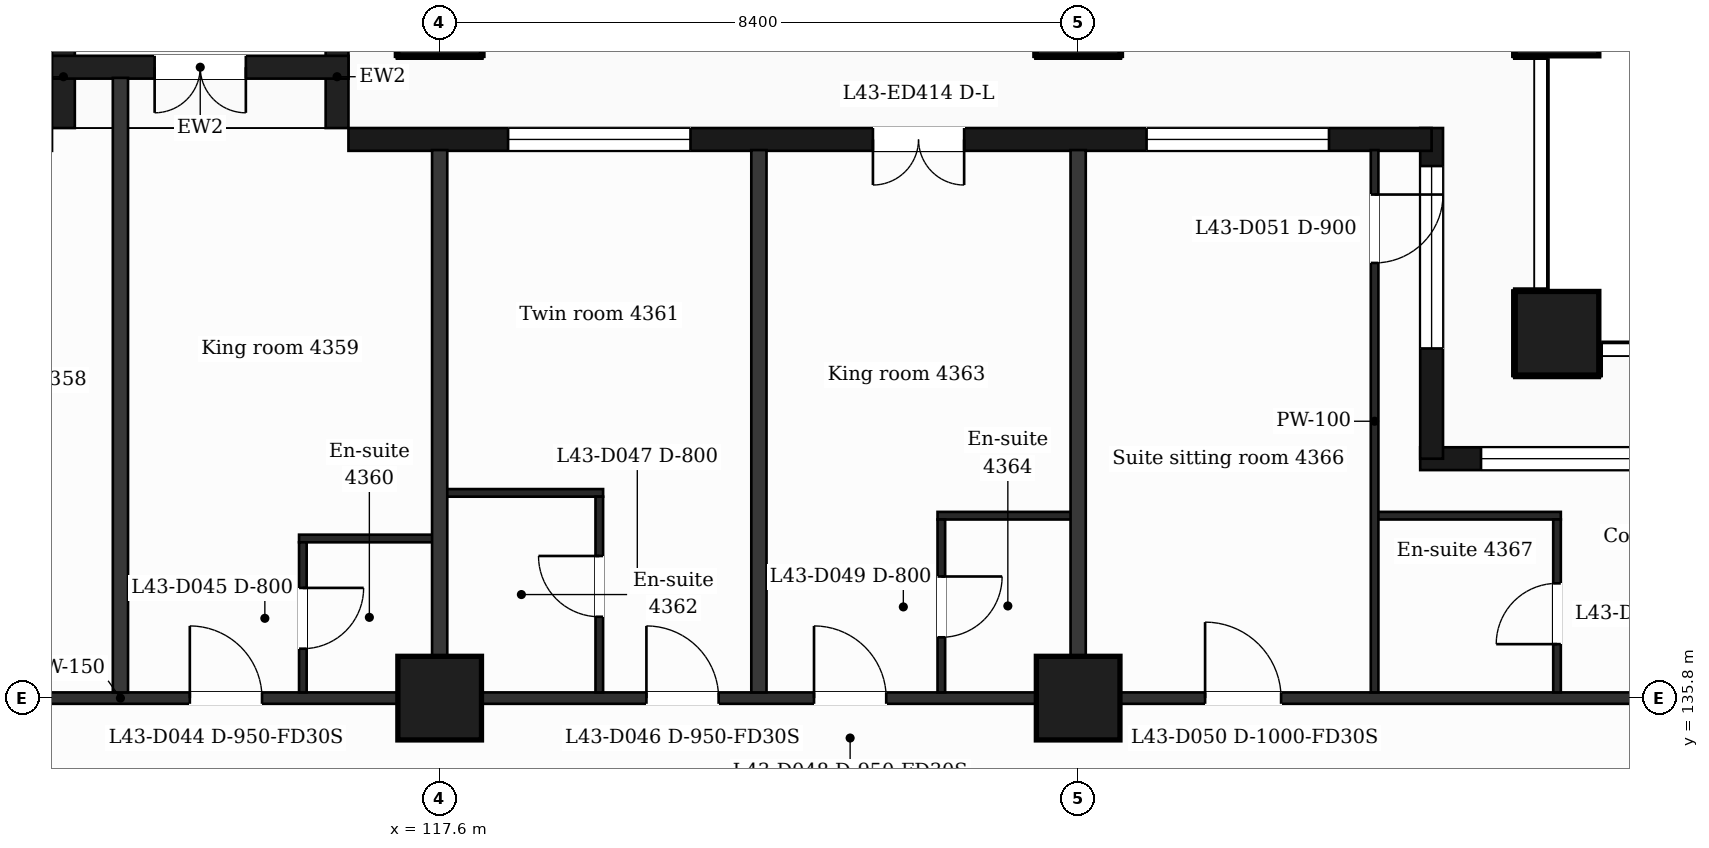
"""IFC4 building model, lengths in metres.
Left out: names, types, materials, properties, quantities, classifications, styles, units other than length and angle.
Written with IfcOpenShell. Run it as: python <this file> out.ifc"""

import sys

from ifc_helpers import new_model, si_unit, direction, frame, frame_2d, origin, origin_2d, place, context, subcontext, project, spatial, rectangle, extrude, element, fill, save


model = new_model("IFC4")
c1 = context("Model", 3, precision=1e-05, world=origin(), true_north=direction((0.0, 1.0)))
c2 = subcontext(c1, "Body", "Model", "MODEL_VIEW")
j1 = project(units=[si_unit("LENGTHUNIT", "METRE"), si_unit("PLANEANGLEUNIT", "RADIAN")], contexts=[c1])
p1 = place(None, origin())
s1 = spatial("IfcSite", under=j1, at=p1, CompositionType="ELEMENT")
p2 = place(p1, origin())
s2 = spatial("IfcBuilding", under=s1, at=p2, CompositionType="ELEMENT")
p3 = place(p2, frame((0.0, 0.0, 181.1)))
s3 = spatial("IfcBuildingStorey", under=s2, at=p3, CompositionType="ELEMENT", Elevation=181.1)
for number, where, z_axis, x_axis in (
    (1, (132.3, 140.6, 0.0), (0.0, 0.0, 1.0), (1.0, 0.0, 0.0)),
    (2, (117.6, 135.8, 0.0), (0.0, 0.0, 1.0), (1.0, 0.0, 0.0)),
    (3, (126.0, 135.8, 0.0), (0.0, 0.0, 1.0), (1.0, 0.0, 0.0)),
    (4, (117.6, 144.8, 0.0), (0.0, 0.0, 1.0), (1.0, 0.0, 0.0)),
    (5, (126.0, 144.8, 0.0), (0.0, 0.0, 1.0), (1.0, 0.0, 0.0)),
    (6, (132.3, 144.8, 0.0), (0.0, 0.0, 1.0), (1.0, 0.0, 0.0)),
):
    element("IfcColumn", number, at=place(p3, frame(where, z_axis=z_axis, x_axis=x_axis)), inside=s3, PredefinedType="COLUMN", context=c2, shape_type="SweptSolid", body=[
        extrude(rectangle(XDim=1.1, YDim=1.1, at=origin_2d()), origin(), (0.0, 0.0, 1.0), 3.7),
    ])
p4 = place(p3, frame((135.623, 138.95, 0.0), z_axis=(0.0, 0.0, 1.0), x_axis=(-1.0, 0.0, 0.0)))
e7 = element("IfcWall", 7, at=p4, inside=s3, PredefinedType="SOLIDWALL", context=c2, shape_type="SweptSolid", body=[
    extrude(rectangle(XDim=5.123, YDim=0.3, at=frame_2d((2.561, 0.0))), origin(), (0.0, 0.0, 1.0), 3.38),
])
p5 = place(p4, frame((1.923, 0.0, 0.9)))
e8 = element("IfcOpeningElement", 8, at=p5, cuts=e7, PredefinedType="OPENING", context=c2, shape_type="SweptSolid", body=[
    extrude(rectangle(XDim=2.4, YDim=2.1, at=frame_2d((1.2, 1.05))), frame((0.0, 0.16, 0.0), z_axis=(0.0, -1.0, 0.0), x_axis=(1.0, 0.0, 0.0)), (0.0, 0.0, 1.0), 0.32),
])
p6 = place(p3, frame((130.65, 138.95, 0.0), z_axis=(0.0, 0.0, 1.0), x_axis=(0.0, 1.0, 0.0)))
e9 = element("IfcWall", 9, at=p6, inside=s3, PredefinedType="SOLIDWALL", context=c2, shape_type="SweptSolid", body=[
    extrude(rectangle(XDim=4.35, YDim=0.3, at=frame_2d((2.175, 0.0))), origin(), (0.0, 0.0, 1.0), 3.38),
])
p7 = place(p6, frame((1.45, 0.0, 0.9)))
e10 = element("IfcOpeningElement", 10, at=p7, cuts=e9, PredefinedType="OPENING", context=c2, shape_type="SweptSolid", body=[
    extrude(rectangle(XDim=2.4, YDim=2.1, at=frame_2d((1.2, 1.05))), frame((0.0, 0.16, 0.0), z_axis=(0.0, -1.0, 0.0), x_axis=(1.0, 0.0, 0.0)), (0.0, 0.0, 1.0), 0.32),
])
p8 = place(p3, frame((130.65, 143.15, 0.0), z_axis=(0.0, 0.0, 1.0), x_axis=(-1.0, 0.0, 0.0)))
e11 = element("IfcWall", 11, at=p8, inside=s3, PredefinedType="SOLIDWALL", context=c2, shape_type="SweptSolid", body=[
    extrude(rectangle(XDim=14.25, YDim=0.3, at=frame_2d((7.125, 0.0))), origin(), (0.0, 0.0, 1.0), 3.38),
])
p9 = place(p8, frame((1.35, 0.0, 0.9)))
e12 = element("IfcOpeningElement", 12, at=p9, cuts=e11, PredefinedType="OPENING", context=c2, shape_type="SweptSolid", body=[
    extrude(rectangle(XDim=2.4, YDim=2.1, at=frame_2d((1.2, 1.05))), frame((0.0, 0.16, 0.0), z_axis=(0.0, -1.0, 0.0), x_axis=(1.0, 0.0, 0.0)), (0.0, 0.0, 1.0), 0.32),
])
p10 = place(p8, frame((6.15, 0.0, 0.0)))
e13 = element("IfcOpeningElement", 13, at=p10, cuts=e11, PredefinedType="OPENING", context=c2, shape_type="SweptSolid", body=[
    extrude(rectangle(XDim=1.2, YDim=2.4, at=frame_2d((0.6, 1.2))), frame((0.0, 0.16, 0.0), z_axis=(0.0, -1.0, 0.0), x_axis=(1.0, 0.0, 0.0)), (0.0, 0.0, 1.0), 0.32),
])
p11 = place(p8, frame((9.75, 0.0, 0.9)))
e14 = element("IfcOpeningElement", 14, at=p11, cuts=e11, PredefinedType="OPENING", context=c2, shape_type="SweptSolid", body=[
    extrude(rectangle(XDim=2.4, YDim=2.1, at=frame_2d((1.2, 1.05))), frame((0.0, 0.16, 0.0), z_axis=(0.0, -1.0, 0.0), x_axis=(1.0, 0.0, 0.0)), (0.0, 0.0, 1.0), 0.32),
])
for number, where, z_axis, x_axis in (
    (15, (116.25, 143.3, 0.0), (0.0, 0.0, 1.0), (0.0, 1.0, 0.0)),
    (16, (112.65, 143.3, 0.0), (0.0, 0.0, 1.0), (0.0, 1.0, 0.0)),
):
    element("IfcWall", number, at=place(p3, frame(where, z_axis=z_axis, x_axis=x_axis)), inside=s3, PredefinedType="SOLIDWALL", context=c2, shape_type="SweptSolid", body=[
        extrude(rectangle(XDim=1.35, YDim=0.3, at=frame_2d((0.675, 0.0))), origin(), (0.0, 0.0, 1.0), 3.38),
    ])
p12 = place(p3, frame((116.4, 144.1, 0.0), z_axis=(0.0, 0.0, 1.0), x_axis=(-1.0, 0.0, 0.0)))
e17 = element("IfcWall", 17, at=p12, inside=s3, PredefinedType="SOLIDWALL", context=c2, shape_type="SweptSolid", body=[
    extrude(rectangle(XDim=3.9, YDim=0.3, at=frame_2d((1.95, 0.0))), origin(), (0.0, 0.0, 1.0), 3.38),
])
p13 = place(p12, frame((1.35, 0.0, 0.0)))
e18 = element("IfcOpeningElement", 18, at=p13, cuts=e17, PredefinedType="OPENING", context=c2, shape_type="SweptSolid", body=[
    extrude(rectangle(XDim=1.2, YDim=2.4, at=frame_2d((0.6, 1.2))), frame((0.0, 0.16, 0.0), z_axis=(0.0, -1.0, 0.0), x_axis=(1.0, 0.0, 0.0)), (0.0, 0.0, 1.0), 0.32),
])
p14 = place(p3, frame((90.895, 135.8, 0.0), z_axis=(0.0, 0.0, 1.0), x_axis=(1.0, 0.0, 0.0)))
e19 = element("IfcWall", 19, at=p14, inside=s3, PredefinedType="PARTITIONING", context=c2, shape_type="SweptSolid", body=[
    extrude(rectangle(XDim=45.011, YDim=0.15, at=frame_2d((22.505, 0.0))), origin(), (0.0, 0.0, 1.0), 3.38),
])
p15 = place(p14, frame((6.906, 0.0, 0.0)))
e20 = element("IfcOpeningElement", 20, at=p15, cuts=e19, PredefinedType="OPENING", context=c2, shape_type="SweptSolid", body=[
    extrude(rectangle(XDim=1.0, YDim=2.1, at=frame_2d((0.5, 1.05))), frame((0.0, 0.085, 0.0), z_axis=(0.0, -1.0, 0.0), x_axis=(1.0, 0.0, 0.0)), (0.0, 0.0, 1.0), 0.17),
])
p16 = place(p14, frame((11.875, 0.0, 0.0)))
e21 = element("IfcOpeningElement", 21, at=p16, cuts=e19, PredefinedType="OPENING", context=c2, shape_type="SweptSolid", body=[
    extrude(rectangle(XDim=0.95, YDim=2.1, at=frame_2d((0.475, 1.05))), frame((0.0, 0.085, 0.0), z_axis=(0.0, -1.0, 0.0), x_axis=(1.0, 0.0, 0.0)), (0.0, 0.0, 1.0), 0.17),
])
p17 = place(p14, frame((19.292, 0.0, 0.0)))
e22 = element("IfcOpeningElement", 22, at=p17, cuts=e19, PredefinedType="OPENING", context=c2, shape_type="SweptSolid", body=[
    extrude(rectangle(XDim=0.95, YDim=2.1, at=frame_2d((0.475, 1.05))), frame((0.0, 0.085, 0.0), z_axis=(0.0, -1.0, 0.0), x_axis=(1.0, 0.0, 0.0)), (0.0, 0.0, 1.0), 0.17),
])
p18 = place(p14, frame((23.418, 0.0, 0.0)))
e23 = element("IfcOpeningElement", 23, at=p18, cuts=e19, PredefinedType="OPENING", context=c2, shape_type="SweptSolid", body=[
    extrude(rectangle(XDim=0.95, YDim=2.1, at=frame_2d((0.475, 1.05))), frame((0.0, 0.085, 0.0), z_axis=(0.0, -1.0, 0.0), x_axis=(1.0, 0.0, 0.0)), (0.0, 0.0, 1.0), 0.17),
])
p19 = place(p14, frame((29.425, 0.0, 0.0)))
e24 = element("IfcOpeningElement", 24, at=p19, cuts=e19, PredefinedType="OPENING", context=c2, shape_type="SweptSolid", body=[
    extrude(rectangle(XDim=0.95, YDim=2.1, at=frame_2d((0.475, 1.05))), frame((0.0, 0.085, 0.0), z_axis=(0.0, -1.0, 0.0), x_axis=(1.0, 0.0, 0.0)), (0.0, 0.0, 1.0), 0.17),
])
p20 = place(p14, frame((31.63, 0.0, 0.0)))
e25 = element("IfcOpeningElement", 25, at=p20, cuts=e19, PredefinedType="OPENING", context=c2, shape_type="SweptSolid", body=[
    extrude(rectangle(XDim=0.95, YDim=2.1, at=frame_2d((0.475, 1.05))), frame((0.0, 0.085, 0.0), z_axis=(0.0, -1.0, 0.0), x_axis=(1.0, 0.0, 0.0)), (0.0, 0.0, 1.0), 0.17),
])
p21 = place(p14, frame((36.775, 0.0, 0.0)))
e26 = element("IfcOpeningElement", 26, at=p21, cuts=e19, PredefinedType="OPENING", context=c2, shape_type="SweptSolid", body=[
    extrude(rectangle(XDim=1.0, YDim=2.1, at=frame_2d((0.5, 1.05))), frame((0.0, 0.085, 0.0), z_axis=(0.0, -1.0, 0.0), x_axis=(1.0, 0.0, 0.0)), (0.0, 0.0, 1.0), 0.17),
])
for number, where, z_axis, x_axis in (
    (27, (115.75, 137.9, 0.0), (0.0, 0.0, 1.0), (1.0, 0.0, 0.0)),
    (28, (124.15, 138.2, 0.0), (0.0, 0.0, 1.0), (1.0, 0.0, 0.0)),
):
    element("IfcWall", number, at=place(p3, frame(where, z_axis=z_axis, x_axis=x_axis)), inside=s3, PredefinedType="PARTITIONING", context=c2, shape_type="SweptSolid", body=[
        extrude(rectangle(XDim=1.85, YDim=0.1, at=frame_2d((0.925, 0.0))), origin(), (0.0, 0.0, 1.0), 3.38),
    ])
p22 = place(p3, frame((129.9, 138.2, 0.0), z_axis=(0.0, 0.0, 1.0), x_axis=(1.0, 0.0, 0.0)))
e29 = element("IfcWall", 29, at=p22, inside=s3, PredefinedType="PARTITIONING", context=c2, shape_type="SweptSolid", body=[
    extrude(rectangle(XDim=2.45, YDim=0.1, at=frame_2d((1.225, 0.0))), origin(), (0.0, 0.0, 1.0), 3.38),
])
p23 = place(p3, frame((117.6, 138.5, 0.0), z_axis=(0.0, 0.0, 1.0), x_axis=(1.0, 0.0, 0.0)))
e30 = element("IfcWall", 30, at=p23, inside=s3, PredefinedType="PARTITIONING", context=c2, shape_type="SweptSolid", body=[
    extrude(rectangle(XDim=2.15, YDim=0.1, at=frame_2d((1.075, 0.0))), origin(), (0.0, 0.0, 1.0), 3.38),
])
p24 = place(p3, frame((113.4, 135.875, 0.0), z_axis=(0.0, 0.0, 1.0), x_axis=(0.0, 1.0, 0.0)))
e31 = element("IfcWall", 31, at=p24, inside=s3, PredefinedType="PARTITIONING", context=c2, shape_type="SweptSolid", body=[
    extrude(rectangle(XDim=8.085, YDim=0.2, at=frame_2d((4.042, 0.0))), origin(), (0.0, 0.0, 1.0), 3.38),
])
p25 = place(p3, frame((115.8, 135.875, 0.0), z_axis=(0.0, 0.0, 1.0), x_axis=(0.0, 1.0, 0.0)))
e32 = element("IfcWall", 32, at=p25, inside=s3, PredefinedType="PARTITIONING", context=c2, shape_type="SweptSolid", body=[
    extrude(rectangle(XDim=1.975, YDim=0.1, at=frame_2d((0.988, 0.0))), origin(), (0.0, 0.0, 1.0), 3.38),
])
p26 = place(p25, frame((0.575, 0.0, 0.0)))
e33 = element("IfcOpeningElement", 33, at=p26, cuts=e32, PredefinedType="OPENING", context=c2, shape_type="SweptSolid", body=[
    extrude(rectangle(XDim=0.8, YDim=2.1, at=frame_2d((0.4, 1.05))), frame((0.0, 0.06, 0.0), z_axis=(0.0, -1.0, 0.0), x_axis=(1.0, 0.0, 0.0)), (0.0, 0.0, 1.0), 0.12),
])
p27 = place(p3, frame((117.6, 135.875, 0.0), z_axis=(0.0, 0.0, 1.0), x_axis=(0.0, 1.0, 0.0)))
e34 = element("IfcWall", 34, at=p27, inside=s3, PredefinedType="PARTITIONING", context=c2, shape_type="SweptSolid", body=[
    extrude(rectangle(XDim=7.135, YDim=0.2, at=frame_2d((3.567, 0.0))), origin(), (0.0, 0.0, 1.0), 3.38),
])
p28 = place(p3, frame((119.7, 135.875, 0.0), z_axis=(0.0, 0.0, 1.0), x_axis=(0.0, 1.0, 0.0)))
e35 = element("IfcWall", 35, at=p28, inside=s3, PredefinedType="PARTITIONING", context=c2, shape_type="SweptSolid", body=[
    extrude(rectangle(XDim=2.575, YDim=0.1, at=frame_2d((1.288, 0.0))), origin(), (0.0, 0.0, 1.0), 3.38),
])
p29 = place(p28, frame((0.995, 0.0, 0.0)))
e36 = element("IfcOpeningElement", 36, at=p29, cuts=e35, PredefinedType="OPENING", context=c2, shape_type="SweptSolid", body=[
    extrude(rectangle(XDim=0.8, YDim=2.1, at=frame_2d((0.4, 1.05))), frame((0.0, 0.06, 0.0), z_axis=(0.0, -1.0, 0.0), x_axis=(1.0, 0.0, 0.0)), (0.0, 0.0, 1.0), 0.12),
])
p30 = place(p3, frame((121.8, 135.875, 0.0), z_axis=(0.0, 0.0, 1.0), x_axis=(0.0, 1.0, 0.0)))
e37 = element("IfcWall", 37, at=p30, inside=s3, PredefinedType="PARTITIONING", context=c2, shape_type="SweptSolid", body=[
    extrude(rectangle(XDim=7.135, YDim=0.2, at=frame_2d((3.567, 0.0))), origin(), (0.0, 0.0, 1.0), 3.38),
])
p31 = place(p3, frame((124.2, 135.875, 0.0), z_axis=(0.0, 0.0, 1.0), x_axis=(0.0, 1.0, 0.0)))
e38 = element("IfcWall", 38, at=p31, inside=s3, PredefinedType="PARTITIONING", context=c2, shape_type="SweptSolid", body=[
    extrude(rectangle(XDim=2.275, YDim=0.1, at=frame_2d((1.137, 0.0))), origin(), (0.0, 0.0, 1.0), 3.38),
])
p32 = place(p31, frame((0.725, 0.0, 0.0)))
e39 = element("IfcOpeningElement", 39, at=p32, cuts=e38, PredefinedType="OPENING", context=c2, shape_type="SweptSolid", body=[
    extrude(rectangle(XDim=0.8, YDim=2.1, at=frame_2d((0.4, 1.05))), frame((0.0, 0.06, 0.0), z_axis=(0.0, -1.0, 0.0), x_axis=(1.0, 0.0, 0.0)), (0.0, 0.0, 1.0), 0.12),
])
p33 = place(p3, frame((126.0, 135.875, 0.0), z_axis=(0.0, 0.0, 1.0), x_axis=(0.0, 1.0, 0.0)))
e40 = element("IfcWall", 40, at=p33, inside=s3, PredefinedType="PARTITIONING", context=c2, shape_type="SweptSolid", body=[
    extrude(rectangle(XDim=7.135, YDim=0.2, at=frame_2d((3.567, 0.0))), origin(), (0.0, 0.0, 1.0), 3.38),
])
p34 = place(p3, frame((129.9, 135.875, 0.0), z_axis=(0.0, 0.0, 1.0), x_axis=(0.0, 1.0, 0.0)))
e41 = element("IfcWall", 41, at=p34, inside=s3, PredefinedType="PARTITIONING", context=c2, shape_type="SweptSolid", body=[
    extrude(rectangle(XDim=7.135, YDim=0.1, at=frame_2d((3.567, 0.0))), origin(), (0.0, 0.0, 1.0), 3.38),
])
p35 = place(p34, frame((5.65, 0.0, 0.0)))
e42 = element("IfcOpeningElement", 42, at=p35, cuts=e41, PredefinedType="OPENING", context=c2, shape_type="SweptSolid", body=[
    extrude(rectangle(XDim=0.9, YDim=2.1, at=frame_2d((0.45, 1.05))), frame((0.0, 0.06, 0.0), z_axis=(0.0, -1.0, 0.0), x_axis=(1.0, 0.0, 0.0)), (0.0, 0.0, 1.0), 0.12),
])
p36 = place(p3, frame((132.3, 135.875, 0.0), z_axis=(0.0, 0.0, 1.0), x_axis=(0.0, 1.0, 0.0)))
e43 = element("IfcWall", 43, at=p36, inside=s3, PredefinedType="PARTITIONING", context=c2, shape_type="SweptSolid", body=[
    extrude(rectangle(XDim=2.275, YDim=0.1, at=frame_2d((1.137, 0.0))), origin(), (0.0, 0.0, 1.0), 3.38),
])
p37 = place(p36, frame((0.635, 0.0, 0.0)))
e44 = element("IfcOpeningElement", 44, at=p37, cuts=e43, PredefinedType="OPENING", context=c2, shape_type="SweptSolid", body=[
    extrude(rectangle(XDim=0.8, YDim=2.1, at=frame_2d((0.4, 1.05))), frame((0.0, 0.06, 0.0), z_axis=(0.0, -1.0, 0.0), x_axis=(1.0, 0.0, 0.0)), (0.0, 0.0, 1.0), 0.12),
])
p38 = place(p5, origin())
e45 = element("IfcWindow", 45, at=p38, inside=s3, PartitioningType="SINGLE_PANEL", PredefinedType="WINDOW", context=c2, shape_type="SweptSolid", body=[
    extrude(rectangle(XDim=2.4, YDim=2.1, at=frame_2d((1.2, 1.05))), frame((0.0, 0.03, 0.0), z_axis=(0.0, -1.0, 0.0), x_axis=(1.0, 0.0, 0.0)), (0.0, 0.0, 1.0), 0.06),
])
fill(e8, e45)
p39 = place(p7, origin())
e46 = element("IfcWindow", 46, at=p39, inside=s3, PartitioningType="SINGLE_PANEL", PredefinedType="WINDOW", context=c2, shape_type="SweptSolid", body=[
    extrude(rectangle(XDim=2.4, YDim=2.1, at=frame_2d((1.2, 1.05))), frame((0.0, 0.03, 0.0), z_axis=(0.0, -1.0, 0.0), x_axis=(1.0, 0.0, 0.0)), (0.0, 0.0, 1.0), 0.06),
])
fill(e10, e46)
p40 = place(p9, origin())
e47 = element("IfcWindow", 47, at=p40, inside=s3, PartitioningType="SINGLE_PANEL", PredefinedType="WINDOW", context=c2, shape_type="SweptSolid", body=[
    extrude(rectangle(XDim=2.4, YDim=2.1, at=frame_2d((1.2, 1.05))), frame((0.0, 0.03, 0.0), z_axis=(0.0, -1.0, 0.0), x_axis=(1.0, 0.0, 0.0)), (0.0, 0.0, 1.0), 0.06),
])
fill(e12, e47)
p41 = place(p10, origin())
e48 = element("IfcDoor", 48, at=p41, inside=s3, OperationType="DOUBLE_DOOR_SINGLE_SWING", PredefinedType="DOOR", context=c2, shape_type="SweptSolid", body=[
    extrude(rectangle(XDim=1.2, YDim=2.4, at=frame_2d((0.6, 1.2))), frame((0.0, 0.025, 0.0), z_axis=(0.0, -1.0, 0.0), x_axis=(1.0, 0.0, 0.0)), (0.0, 0.0, 1.0), 0.05),
])
fill(e13, e48)
p42 = place(p11, origin())
e49 = element("IfcWindow", 49, at=p42, inside=s3, PartitioningType="SINGLE_PANEL", PredefinedType="WINDOW", context=c2, shape_type="SweptSolid", body=[
    extrude(rectangle(XDim=2.4, YDim=2.1, at=frame_2d((1.2, 1.05))), frame((0.0, 0.03, 0.0), z_axis=(0.0, -1.0, 0.0), x_axis=(1.0, 0.0, 0.0)), (0.0, 0.0, 1.0), 0.06),
])
fill(e14, e49)
p43 = place(p13, origin())
e50 = element("IfcDoor", 50, at=p43, inside=s3, OperationType="DOUBLE_DOOR_SINGLE_SWING", PredefinedType="DOOR", context=c2, shape_type="SweptSolid", body=[
    extrude(rectangle(XDim=1.2, YDim=2.4, at=frame_2d((0.6, 1.2))), frame((0.0, 0.025, 0.0), z_axis=(0.0, -1.0, 0.0), x_axis=(1.0, 0.0, 0.0)), (0.0, 0.0, 1.0), 0.05),
])
fill(e18, e50)
p44 = place(p18, origin())
e51 = element("IfcDoor", 51, at=p44, inside=s3, OperationType="SINGLE_SWING_LEFT", PredefinedType="DOOR", context=c2, shape_type="SweptSolid", body=[
    extrude(rectangle(XDim=0.95, YDim=2.1, at=frame_2d((0.475, 1.05))), frame((0.0, 0.025, 0.0), z_axis=(0.0, -1.0, 0.0), x_axis=(1.0, 0.0, 0.0)), (0.0, 0.0, 1.0), 0.05),
])
fill(e23, e51)
p45 = place(p26, origin())
e52 = element("IfcDoor", 52, at=p45, inside=s3, OperationType="SINGLE_SWING_RIGHT", PredefinedType="DOOR", context=c2, shape_type="SweptSolid", body=[
    extrude(rectangle(XDim=0.8, YDim=2.1, at=frame_2d((0.4, 1.05))), frame((0.0, 0.025, 0.0), z_axis=(0.0, -1.0, 0.0), x_axis=(1.0, 0.0, 0.0)), (0.0, 0.0, 1.0), 0.05),
])
fill(e33, e52)
p46 = place(p19, origin())
e53 = element("IfcDoor", 53, at=p46, inside=s3, OperationType="SINGLE_SWING_LEFT", PredefinedType="DOOR", context=c2, shape_type="SweptSolid", body=[
    extrude(rectangle(XDim=0.95, YDim=2.1, at=frame_2d((0.475, 1.05))), frame((0.0, 0.025, 0.0), z_axis=(0.0, -1.0, 0.0), x_axis=(1.0, 0.0, 0.0)), (0.0, 0.0, 1.0), 0.05),
])
fill(e24, e53)
p47 = place(p29, origin())
e54 = element("IfcDoor", 54, at=p47, inside=s3, OperationType="SINGLE_SWING_RIGHT", PredefinedType="DOOR", context=c2, shape_type="SweptSolid", body=[
    extrude(rectangle(XDim=0.8, YDim=2.1, at=frame_2d((0.4, 1.05))), frame((0.0, 0.025, 0.0), z_axis=(0.0, -1.0, 0.0), x_axis=(1.0, 0.0, 0.0)), (0.0, 0.0, 1.0), 0.05),
])
fill(e36, e54)
p48 = place(p20, origin())
e55 = element("IfcDoor", 55, at=p48, inside=s3, OperationType="SINGLE_SWING_LEFT", PredefinedType="DOOR", context=c2, shape_type="SweptSolid", body=[
    extrude(rectangle(XDim=0.95, YDim=2.1, at=frame_2d((0.475, 1.05))), frame((0.0, 0.025, 0.0), z_axis=(0.0, -1.0, 0.0), x_axis=(1.0, 0.0, 0.0)), (0.0, 0.0, 1.0), 0.05),
])
fill(e25, e55)
p49 = place(p32, origin())
e56 = element("IfcDoor", 56, at=p49, inside=s3, OperationType="SINGLE_SWING_RIGHT", PredefinedType="DOOR", context=c2, shape_type="SweptSolid", body=[
    extrude(rectangle(XDim=0.8, YDim=2.1, at=frame_2d((0.4, 1.05))), frame((0.0, 0.025, 0.0), z_axis=(0.0, -1.0, 0.0), x_axis=(1.0, 0.0, 0.0)), (0.0, 0.0, 1.0), 0.05),
])
fill(e39, e56)
p50 = place(p21, origin())
e57 = element("IfcDoor", 57, at=p50, inside=s3, OperationType="SINGLE_SWING_LEFT", PredefinedType="DOOR", context=c2, shape_type="SweptSolid", body=[
    extrude(rectangle(XDim=1.0, YDim=2.1, at=frame_2d((0.5, 1.05))), frame((0.0, 0.025, 0.0), z_axis=(0.0, -1.0, 0.0), x_axis=(1.0, 0.0, 0.0)), (0.0, 0.0, 1.0), 0.05),
])
fill(e26, e57)
p51 = place(p35, origin())
e58 = element("IfcDoor", 58, at=p51, inside=s3, OperationType="SINGLE_SWING_RIGHT", PredefinedType="DOOR", context=c2, shape_type="SweptSolid", body=[
    extrude(rectangle(XDim=0.9, YDim=2.1, at=frame_2d((0.45, 1.05))), frame((0.0, 0.025, 0.0), z_axis=(0.0, -1.0, 0.0), x_axis=(1.0, 0.0, 0.0)), (0.0, 0.0, 1.0), 0.05),
])
fill(e42, e58)
p52 = place(p37, origin())
e59 = element("IfcDoor", 59, at=p52, inside=s3, OperationType="SINGLE_SWING_LEFT", PredefinedType="DOOR", context=c2, shape_type="SweptSolid", body=[
    extrude(rectangle(XDim=0.8, YDim=2.1, at=frame_2d((0.4, 1.05))), frame((0.0, 0.025, 0.0), z_axis=(0.0, -1.0, 0.0), x_axis=(1.0, 0.0, 0.0)), (0.0, 0.0, 1.0), 0.05),
])
fill(e44, e59)
save(model, sys.argv[1])
